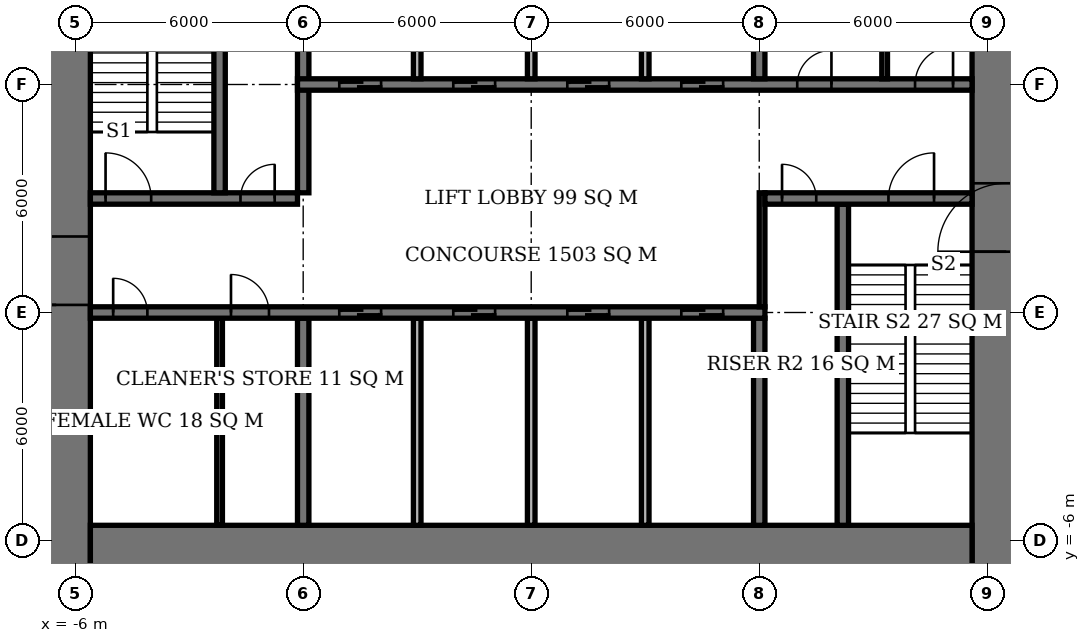
"""IFC4 building model, lengths in metres.
Left out: names, types, materials, properties, quantities, classifications, styles, units other than length and angle.
Written with IfcOpenShell. Run it as: python <this file> out.ifc"""

import sys

from ifc_helpers import new_model, si_unit, direction, frame, frame_2d, origin, place, context, subcontext, project, spatial, rectangle, extrude, element, fill, save


model = new_model("IFC4")
c1 = context("Model", 3, precision=1e-05, world=origin(), true_north=direction((0.0, 1.0)))
c2 = subcontext(c1, "Body", "Model", "MODEL_VIEW")
j1 = project(units=[si_unit("LENGTHUNIT", "METRE"), si_unit("PLANEANGLEUNIT", "RADIAN")], contexts=[c1])
p1 = place(None, origin())
s1 = spatial("IfcSite", under=j1, at=p1, CompositionType="ELEMENT")
p2 = place(p1, origin())
s2 = spatial("IfcBuilding", under=s1, at=p2, CompositionType="ELEMENT")
p3 = place(p2, origin())
s3 = spatial("IfcBuildingStorey", under=s2, at=p3, CompositionType="ELEMENT", Elevation=0.0)
p4 = place(p3, frame((-5.6, -6.6, 0.0), z_axis=(0.0, 0.0, 1.0), x_axis=(1.0, 0.0, 0.0)))
e1 = element("IfcWall", 1, at=p4, inside=s3, PredefinedType="SHEAR", context=c2, shape_type="SweptSolid", body=[
    extrude(rectangle(XDim=23.2, YDim=2.0, at=frame_2d((11.6, 0.0))), origin(), (0.0, 0.0, 1.0), 6.0),
])
p5 = place(p3, frame((-6.5, -7.6, 0.0), z_axis=(0.0, 0.0, 1.0), x_axis=(0.0, 1.0, 0.0)))
e2 = element("IfcWall", 2, at=p5, inside=s3, PredefinedType="SHEAR", context=c2, shape_type="SweptSolid", body=[
    extrude(rectangle(XDim=21.2, YDim=1.8, at=frame_2d((10.6, 0.0))), origin(), (0.0, 0.0, 1.0), 6.0),
])
p6 = place(p5, frame((7.8, 0.0, 0.0)))
e3 = element("IfcOpeningElement", 3, at=p6, cuts=e2, PredefinedType="OPENING", context=c2, shape_type="SweptSolid", body=[
    extrude(rectangle(XDim=1.8, YDim=2.4, at=frame_2d((0.9, 1.2))), frame((0.0, 0.91, 0.0), z_axis=(0.0, -1.0, 0.0), x_axis=(1.0, 0.0, 0.0)), (0.0, 0.0, 1.0), 1.82),
])
p7 = place(p3, frame((18.5, -7.6, 0.0), z_axis=(0.0, 0.0, 1.0), x_axis=(0.0, 1.0, 0.0)))
e4 = element("IfcWall", 4, at=p7, inside=s3, PredefinedType="SHEAR", context=c2, shape_type="SweptSolid", body=[
    extrude(rectangle(XDim=21.2, YDim=1.8, at=frame_2d((10.6, 0.0))), origin(), (0.0, 0.0, 1.0), 6.0),
])
p8 = place(p7, frame((9.2, 0.0, 0.0)))
e5 = element("IfcOpeningElement", 5, at=p8, cuts=e4, PredefinedType="OPENING", context=c2, shape_type="SweptSolid", body=[
    extrude(rectangle(XDim=1.8, YDim=2.4, at=frame_2d((0.9, 1.2))), frame((0.0, 0.91, 0.0), z_axis=(0.0, -1.0, 0.0), x_axis=(1.0, 0.0, 0.0)), (0.0, 0.0, 1.0), 1.82),
])
p9 = place(p3, frame((-5.6, 0.0, 0.0), z_axis=(0.0, 0.0, 1.0), x_axis=(1.0, 0.0, 0.0)))
e6 = element("IfcWall", 6, at=p9, inside=s3, PredefinedType="SHEAR", context=c2, shape_type="SweptSolid", body=[
    extrude(rectangle(XDim=17.75, YDim=0.3, at=frame_2d((8.875, 0.0))), origin(), (0.0, 0.0, 1.0), 6.0),
])
p10 = place(p9, frame((0.6, 0.0, 0.0)))
e7 = element("IfcOpeningElement", 7, at=p10, cuts=e6, PredefinedType="OPENING", context=c2, shape_type="SweptSolid", body=[
    extrude(rectangle(XDim=0.9, YDim=2.1, at=frame_2d((0.45, 1.05))), frame((0.0, 0.16, 0.0), z_axis=(0.0, -1.0, 0.0), x_axis=(1.0, 0.0, 0.0)), (0.0, 0.0, 1.0), 0.32),
])
p11 = place(p9, frame((3.7, 0.0, 0.0)))
e8 = element("IfcOpeningElement", 8, at=p11, cuts=e6, PredefinedType="OPENING", context=c2, shape_type="SweptSolid", body=[
    extrude(rectangle(XDim=1.0, YDim=2.1, at=frame_2d((0.5, 1.05))), frame((0.0, 0.16, 0.0), z_axis=(0.0, -1.0, 0.0), x_axis=(1.0, 0.0, 0.0)), (0.0, 0.0, 1.0), 0.32),
])
p12 = place(p9, frame((6.55, 0.0, 0.0)))
e9 = element("IfcOpeningElement", 9, at=p12, cuts=e6, PredefinedType="OPENING", context=c2, shape_type="SweptSolid", body=[
    extrude(rectangle(XDim=1.1, YDim=2.1, at=frame_2d((0.55, 1.05))), frame((0.0, 0.16, 0.0), z_axis=(0.0, -1.0, 0.0), x_axis=(1.0, 0.0, 0.0)), (0.0, 0.0, 1.0), 0.32),
])
p13 = place(p9, frame((9.55, 0.0, 0.0)))
e10 = element("IfcOpeningElement", 10, at=p13, cuts=e6, PredefinedType="OPENING", context=c2, shape_type="SweptSolid", body=[
    extrude(rectangle(XDim=1.1, YDim=2.1, at=frame_2d((0.55, 1.05))), frame((0.0, 0.16, 0.0), z_axis=(0.0, -1.0, 0.0), x_axis=(1.0, 0.0, 0.0)), (0.0, 0.0, 1.0), 0.32),
])
p14 = place(p9, frame((12.55, 0.0, 0.0)))
e11 = element("IfcOpeningElement", 11, at=p14, cuts=e6, PredefinedType="OPENING", context=c2, shape_type="SweptSolid", body=[
    extrude(rectangle(XDim=1.1, YDim=2.1, at=frame_2d((0.55, 1.05))), frame((0.0, 0.16, 0.0), z_axis=(0.0, -1.0, 0.0), x_axis=(1.0, 0.0, 0.0)), (0.0, 0.0, 1.0), 0.32),
])
p15 = place(p9, frame((15.55, 0.0, 0.0)))
e12 = element("IfcOpeningElement", 12, at=p15, cuts=e6, PredefinedType="OPENING", context=c2, shape_type="SweptSolid", body=[
    extrude(rectangle(XDim=1.1, YDim=2.1, at=frame_2d((0.55, 1.05))), frame((0.0, 0.16, 0.0), z_axis=(0.0, -1.0, 0.0), x_axis=(1.0, 0.0, 0.0)), (0.0, 0.0, 1.0), 0.32),
])
p16 = place(p3, frame((-5.6, 3.0, 0.0), z_axis=(0.0, 0.0, 1.0), x_axis=(1.0, 0.0, 0.0)))
e13 = element("IfcWall", 13, at=p16, inside=s3, PredefinedType="SHEAR", context=c2, shape_type="SweptSolid", body=[
    extrude(rectangle(XDim=5.45, YDim=0.3, at=frame_2d((2.725, 0.0))), origin(), (0.0, 0.0, 1.0), 6.0),
])
p17 = place(p16, frame((0.4, 0.0, 0.0)))
e14 = element("IfcOpeningElement", 14, at=p17, cuts=e13, PredefinedType="OPENING", context=c2, shape_type="SweptSolid", body=[
    extrude(rectangle(XDim=1.2, YDim=2.1, at=frame_2d((0.6, 1.05))), frame((0.0, 0.16, 0.0), z_axis=(0.0, -1.0, 0.0), x_axis=(1.0, 0.0, 0.0)), (0.0, 0.0, 1.0), 0.32),
])
p18 = place(p16, frame((3.95, 0.0, 0.0)))
e15 = element("IfcOpeningElement", 15, at=p18, cuts=e13, PredefinedType="OPENING", context=c2, shape_type="SweptSolid", body=[
    extrude(rectangle(XDim=0.9, YDim=2.1, at=frame_2d((0.45, 1.05))), frame((0.0, 0.16, 0.0), z_axis=(0.0, -1.0, 0.0), x_axis=(1.0, 0.0, 0.0)), (0.0, 0.0, 1.0), 0.32),
])
p19 = place(p3, frame((12.15, 3.0, 0.0), z_axis=(0.0, 0.0, 1.0), x_axis=(1.0, 0.0, 0.0)))
e16 = element("IfcWall", 16, at=p19, inside=s3, PredefinedType="SHEAR", context=c2, shape_type="SweptSolid", body=[
    extrude(rectangle(XDim=5.45, YDim=0.3, at=frame_2d((2.725, 0.0))), origin(), (0.0, 0.0, 1.0), 6.0),
])
p20 = place(p19, frame((3.25, 0.0, 0.0)))
e17 = element("IfcOpeningElement", 17, at=p20, cuts=e16, PredefinedType="OPENING", context=c2, shape_type="SweptSolid", body=[
    extrude(rectangle(XDim=1.2, YDim=2.1, at=frame_2d((0.6, 1.05))), frame((0.0, 0.16, 0.0), z_axis=(0.0, -1.0, 0.0), x_axis=(1.0, 0.0, 0.0)), (0.0, 0.0, 1.0), 0.32),
])
p21 = place(p19, frame((0.45, 0.0, 0.0)))
e18 = element("IfcOpeningElement", 18, at=p21, cuts=e16, PredefinedType="OPENING", context=c2, shape_type="SweptSolid", body=[
    extrude(rectangle(XDim=0.9, YDim=2.1, at=frame_2d((0.45, 1.05))), frame((0.0, 0.16, 0.0), z_axis=(0.0, -1.0, 0.0), x_axis=(1.0, 0.0, 0.0)), (0.0, 0.0, 1.0), 0.32),
])
p22 = place(p3, frame((-0.15, 6.0, 0.0), z_axis=(0.0, 0.0, 1.0), x_axis=(1.0, 0.0, 0.0)))
e19 = element("IfcWall", 19, at=p22, inside=s3, PredefinedType="SHEAR", context=c2, shape_type="SweptSolid", body=[
    extrude(rectangle(XDim=17.75, YDim=0.3, at=frame_2d((8.875, 0.0))), origin(), (0.0, 0.0, 1.0), 6.0),
])
p23 = place(p22, frame((13.15, 0.0, 0.0)))
e20 = element("IfcOpeningElement", 20, at=p23, cuts=e19, PredefinedType="OPENING", context=c2, shape_type="SweptSolid", body=[
    extrude(rectangle(XDim=0.9, YDim=2.1, at=frame_2d((0.45, 1.05))), frame((0.0, 0.16, 0.0), z_axis=(0.0, -1.0, 0.0), x_axis=(1.0, 0.0, 0.0)), (0.0, 0.0, 1.0), 0.32),
])
p24 = place(p22, frame((16.25, 0.0, 0.0)))
e21 = element("IfcOpeningElement", 21, at=p24, cuts=e19, PredefinedType="OPENING", context=c2, shape_type="SweptSolid", body=[
    extrude(rectangle(XDim=1.0, YDim=2.1, at=frame_2d((0.5, 1.05))), frame((0.0, 0.16, 0.0), z_axis=(0.0, -1.0, 0.0), x_axis=(1.0, 0.0, 0.0)), (0.0, 0.0, 1.0), 0.32),
])
p25 = place(p22, frame((1.1, 0.0, 0.0)))
e22 = element("IfcOpeningElement", 22, at=p25, cuts=e19, PredefinedType="OPENING", context=c2, shape_type="SweptSolid", body=[
    extrude(rectangle(XDim=1.1, YDim=2.1, at=frame_2d((0.55, 1.05))), frame((0.0, 0.16, 0.0), z_axis=(0.0, -1.0, 0.0), x_axis=(1.0, 0.0, 0.0)), (0.0, 0.0, 1.0), 0.32),
])
p26 = place(p22, frame((4.1, 0.0, 0.0)))
e23 = element("IfcOpeningElement", 23, at=p26, cuts=e19, PredefinedType="OPENING", context=c2, shape_type="SweptSolid", body=[
    extrude(rectangle(XDim=1.1, YDim=2.1, at=frame_2d((0.55, 1.05))), frame((0.0, 0.16, 0.0), z_axis=(0.0, -1.0, 0.0), x_axis=(1.0, 0.0, 0.0)), (0.0, 0.0, 1.0), 0.32),
])
p27 = place(p22, frame((7.1, 0.0, 0.0)))
e24 = element("IfcOpeningElement", 24, at=p27, cuts=e19, PredefinedType="OPENING", context=c2, shape_type="SweptSolid", body=[
    extrude(rectangle(XDim=1.1, YDim=2.1, at=frame_2d((0.55, 1.05))), frame((0.0, 0.16, 0.0), z_axis=(0.0, -1.0, 0.0), x_axis=(1.0, 0.0, 0.0)), (0.0, 0.0, 1.0), 0.32),
])
p28 = place(p22, frame((10.1, 0.0, 0.0)))
e25 = element("IfcOpeningElement", 25, at=p28, cuts=e19, PredefinedType="OPENING", context=c2, shape_type="SweptSolid", body=[
    extrude(rectangle(XDim=1.1, YDim=2.1, at=frame_2d((0.55, 1.05))), frame((0.0, 0.16, 0.0), z_axis=(0.0, -1.0, 0.0), x_axis=(1.0, 0.0, 0.0)), (0.0, 0.0, 1.0), 0.32),
])
p29 = place(p3, frame((0.0, -5.6, 0.0), z_axis=(0.0, 0.0, 1.0), x_axis=(0.0, 1.0, 0.0)))
e26 = element("IfcWall", 26, at=p29, inside=s3, PredefinedType="SHEAR", context=c2, shape_type="SweptSolid", body=[
    extrude(rectangle(XDim=5.45, YDim=0.3, at=frame_2d((2.725, 0.0))), origin(), (0.0, 0.0, 1.0), 6.0),
])
p30 = place(p3, frame((0.0, 3.15, 0.0), z_axis=(0.0, 0.0, 1.0), x_axis=(0.0, 1.0, 0.0)))
e27 = element("IfcWall", 27, at=p30, inside=s3, PredefinedType="SHEAR", context=c2, shape_type="SweptSolid", body=[
    extrude(rectangle(XDim=8.45, YDim=0.3, at=frame_2d((4.225, 0.0))), origin(), (0.0, 0.0, 1.0), 6.0),
])
for number, where, z_axis, x_axis in (
    (28, (12.0, -5.6, 0.0), (0.0, 0.0, 1.0), (0.0, 1.0, 0.0)),
    (29, (12.0, 6.15, 0.0), (0.0, 0.0, 1.0), (0.0, 1.0, 0.0)),
):
    element("IfcWall", number, at=place(p3, frame(where, z_axis=z_axis, x_axis=x_axis)), inside=s3, PredefinedType="SHEAR", context=c2, shape_type="SweptSolid", body=[
        extrude(rectangle(XDim=5.45, YDim=0.3, at=frame_2d((2.725, 0.0))), origin(), (0.0, 0.0, 1.0), 6.0),
    ])
for number, where, z_axis, x_axis in (
    (30, (-2.2, 3.15, 0.0), (0.0, 0.0, 1.0), (0.0, 1.0, 0.0)),
    (31, (14.2, -5.6, 0.0), (0.0, 0.0, 1.0), (0.0, 1.0, 0.0)),
):
    element("IfcWall", number, at=place(p3, frame(where, z_axis=z_axis, x_axis=x_axis)), inside=s3, PredefinedType="SHEAR", context=c2, shape_type="SweptSolid", body=[
        extrude(rectangle(XDim=8.45, YDim=0.3, at=frame_2d((4.225, 0.0))), origin(), (0.0, 0.0, 1.0), 6.0),
    ])
for number, where, z_axis, x_axis in (
    (32, (3.0, 6.15, 0.0), (0.0, 0.0, 1.0), (0.0, 1.0, 0.0)),
    (33, (6.0, 6.15, 0.0), (0.0, 0.0, 1.0), (0.0, 1.0, 0.0)),
    (34, (9.0, 6.15, 0.0), (0.0, 0.0, 1.0), (0.0, 1.0, 0.0)),
    (35, (3.0, -5.6, 0.0), (0.0, 0.0, 1.0), (0.0, 1.0, 0.0)),
    (36, (6.0, -5.6, 0.0), (0.0, 0.0, 1.0), (0.0, 1.0, 0.0)),
    (37, (9.0, -5.6, 0.0), (0.0, 0.0, 1.0), (0.0, 1.0, 0.0)),
):
    element("IfcWall", number, at=place(p3, frame(where, z_axis=z_axis, x_axis=x_axis)), inside=s3, PredefinedType="SOLIDWALL", context=c2, shape_type="SweptSolid", body=[
        extrude(rectangle(XDim=5.45, YDim=0.2, at=frame_2d((2.725, 0.0))), origin(), (0.0, 0.0, 1.0), 6.0),
    ])
for number, where, z_axis, x_axis in (
    (38, (-2.2, -5.6, 0.0), (0.0, 0.0, 1.0), (0.0, 1.0, 0.0)),
    (39, (15.3, 6.15, 0.0), (0.0, 0.0, 1.0), (0.0, 1.0, 0.0)),
):
    element("IfcWall", number, at=place(p3, frame(where, z_axis=z_axis, x_axis=x_axis)), inside=s3, PredefinedType="PLUMBINGWALL", context=c2, shape_type="SweptSolid", body=[
        extrude(rectangle(XDim=5.45, YDim=0.15, at=frame_2d((2.725, 0.0))), origin(), (0.0, 0.0, 1.0), 5.75),
    ])
p31 = place(p3, frame((12.075, 0.15, 0.0), z_axis=(0.0, 0.0, 1.0), x_axis=(0.0, 1.0, 0.0)))
e40 = element("IfcWall", 40, at=p31, inside=s3, PredefinedType="PARTITIONING", context=c2, shape_type="SweptSolid", body=[
    extrude(rectangle(XDim=3.0, YDim=0.15, at=frame_2d((1.5, 0.0))), origin(), (0.0, 0.0, 1.0), 5.75),
])
p32 = place(p6, origin())
e41 = element("IfcDoor", 41, at=p32, inside=s3, OperationType="DOUBLE_DOOR_SINGLE_SWING", PredefinedType="DOOR", context=c2, shape_type="SweptSolid", body=[
    extrude(rectangle(XDim=1.8, YDim=2.4, at=frame_2d((0.9, 1.2))), frame((0.0, 0.025, 0.0), z_axis=(0.0, -1.0, 0.0), x_axis=(1.0, 0.0, 0.0)), (0.0, 0.0, 1.0), 0.05),
])
fill(e3, e41)
p33 = place(p8, origin())
e42 = element("IfcDoor", 42, at=p33, inside=s3, OperationType="DOUBLE_DOOR_SINGLE_SWING", PredefinedType="DOOR", context=c2, shape_type="SweptSolid", body=[
    extrude(rectangle(XDim=1.8, YDim=2.4, at=frame_2d((0.9, 1.2))), frame((0.0, 0.025, 0.0), z_axis=(0.0, -1.0, 0.0), x_axis=(1.0, 0.0, 0.0)), (0.0, 0.0, 1.0), 0.05),
])
fill(e5, e42)
p34 = place(p17, origin())
e43 = element("IfcDoor", 43, at=p34, inside=s3, OperationType="SINGLE_SWING_LEFT", PredefinedType="DOOR", context=c2, shape_type="SweptSolid", body=[
    extrude(rectangle(XDim=1.2, YDim=2.1, at=frame_2d((0.6, 1.05))), frame((0.0, 0.025, 0.0), z_axis=(0.0, -1.0, 0.0), x_axis=(1.0, 0.0, 0.0)), (0.0, 0.0, 1.0), 0.05),
])
fill(e14, e43)
p35 = place(p18, origin())
e44 = element("IfcDoor", 44, at=p35, inside=s3, OperationType="SINGLE_SWING_RIGHT", PredefinedType="DOOR", context=c2, shape_type="SweptSolid", body=[
    extrude(rectangle(XDim=0.9, YDim=2.1, at=frame_2d((0.45, 1.05))), frame((0.0, 0.025, 0.0), z_axis=(0.0, -1.0, 0.0), x_axis=(1.0, 0.0, 0.0)), (0.0, 0.0, 1.0), 0.05),
])
fill(e15, e44)
p36 = place(p20, origin())
e45 = element("IfcDoor", 45, at=p36, inside=s3, OperationType="SINGLE_SWING_RIGHT", PredefinedType="DOOR", context=c2, shape_type="SweptSolid", body=[
    extrude(rectangle(XDim=1.2, YDim=2.1, at=frame_2d((0.6, 1.05))), frame((0.0, 0.025, 0.0), z_axis=(0.0, -1.0, 0.0), x_axis=(1.0, 0.0, 0.0)), (0.0, 0.0, 1.0), 0.05),
])
fill(e17, e45)
p37 = place(p21, origin())
e46 = element("IfcDoor", 46, at=p37, inside=s3, OperationType="SINGLE_SWING_LEFT", PredefinedType="DOOR", context=c2, shape_type="SweptSolid", body=[
    extrude(rectangle(XDim=0.9, YDim=2.1, at=frame_2d((0.45, 1.05))), frame((0.0, 0.025, 0.0), z_axis=(0.0, -1.0, 0.0), x_axis=(1.0, 0.0, 0.0)), (0.0, 0.0, 1.0), 0.05),
])
fill(e18, e46)
p38 = place(p10, origin())
e47 = element("IfcDoor", 47, at=p38, inside=s3, OperationType="SINGLE_SWING_LEFT", PredefinedType="DOOR", context=c2, shape_type="SweptSolid", body=[
    extrude(rectangle(XDim=0.9, YDim=2.1, at=frame_2d((0.45, 1.05))), frame((0.0, 0.025, 0.0), z_axis=(0.0, -1.0, 0.0), x_axis=(1.0, 0.0, 0.0)), (0.0, 0.0, 1.0), 0.05),
])
fill(e7, e47)
p39 = place(p11, origin())
e48 = element("IfcDoor", 48, at=p39, inside=s3, OperationType="SINGLE_SWING_LEFT", PredefinedType="DOOR", context=c2, shape_type="SweptSolid", body=[
    extrude(rectangle(XDim=1.0, YDim=2.1, at=frame_2d((0.5, 1.05))), frame((0.0, 0.025, 0.0), z_axis=(0.0, -1.0, 0.0), x_axis=(1.0, 0.0, 0.0)), (0.0, 0.0, 1.0), 0.05),
])
fill(e8, e48)
p40 = place(p23, origin())
e49 = element("IfcDoor", 49, at=p40, inside=s3, OperationType="SINGLE_SWING_RIGHT", PredefinedType="DOOR", context=c2, shape_type="SweptSolid", body=[
    extrude(rectangle(XDim=0.9, YDim=2.1, at=frame_2d((0.45, 1.05))), frame((0.0, 0.025, 0.0), z_axis=(0.0, -1.0, 0.0), x_axis=(1.0, 0.0, 0.0)), (0.0, 0.0, 1.0), 0.05),
])
fill(e20, e49)
p41 = place(p24, origin())
e50 = element("IfcDoor", 50, at=p41, inside=s3, OperationType="SINGLE_SWING_RIGHT", PredefinedType="DOOR", context=c2, shape_type="SweptSolid", body=[
    extrude(rectangle(XDim=1.0, YDim=2.1, at=frame_2d((0.5, 1.05))), frame((0.0, 0.025, 0.0), z_axis=(0.0, -1.0, 0.0), x_axis=(1.0, 0.0, 0.0)), (0.0, 0.0, 1.0), 0.05),
])
fill(e21, e50)
p42 = place(p25, origin())
e51 = element("IfcDoor", 51, at=p42, inside=s3, OperationType="DOUBLE_DOOR_SLIDING", PredefinedType="USERDEFINED", context=c2, shape_type="SweptSolid", body=[
    extrude(rectangle(XDim=1.1, YDim=2.1, at=frame_2d((0.55, 1.05))), frame((0.0, 0.025, 0.0), z_axis=(0.0, -1.0, 0.0), x_axis=(1.0, 0.0, 0.0)), (0.0, 0.0, 1.0), 0.05),
])
fill(e22, e51)
p43 = place(p26, origin())
e52 = element("IfcDoor", 52, at=p43, inside=s3, OperationType="DOUBLE_DOOR_SLIDING", PredefinedType="USERDEFINED", context=c2, shape_type="SweptSolid", body=[
    extrude(rectangle(XDim=1.1, YDim=2.1, at=frame_2d((0.55, 1.05))), frame((0.0, 0.025, 0.0), z_axis=(0.0, -1.0, 0.0), x_axis=(1.0, 0.0, 0.0)), (0.0, 0.0, 1.0), 0.05),
])
fill(e23, e52)
p44 = place(p27, origin())
e53 = element("IfcDoor", 53, at=p44, inside=s3, OperationType="DOUBLE_DOOR_SLIDING", PredefinedType="USERDEFINED", context=c2, shape_type="SweptSolid", body=[
    extrude(rectangle(XDim=1.1, YDim=2.1, at=frame_2d((0.55, 1.05))), frame((0.0, 0.025, 0.0), z_axis=(0.0, -1.0, 0.0), x_axis=(1.0, 0.0, 0.0)), (0.0, 0.0, 1.0), 0.05),
])
fill(e24, e53)
p45 = place(p28, origin())
e54 = element("IfcDoor", 54, at=p45, inside=s3, OperationType="DOUBLE_DOOR_SLIDING", PredefinedType="USERDEFINED", context=c2, shape_type="SweptSolid", body=[
    extrude(rectangle(XDim=1.1, YDim=2.1, at=frame_2d((0.55, 1.05))), frame((0.0, 0.025, 0.0), z_axis=(0.0, -1.0, 0.0), x_axis=(1.0, 0.0, 0.0)), (0.0, 0.0, 1.0), 0.05),
])
fill(e25, e54)
p46 = place(p12, origin())
e55 = element("IfcDoor", 55, at=p46, inside=s3, OperationType="DOUBLE_DOOR_SLIDING", PredefinedType="USERDEFINED", context=c2, shape_type="SweptSolid", body=[
    extrude(rectangle(XDim=1.1, YDim=2.1, at=frame_2d((0.55, 1.05))), frame((0.0, 0.025, 0.0), z_axis=(0.0, -1.0, 0.0), x_axis=(1.0, 0.0, 0.0)), (0.0, 0.0, 1.0), 0.05),
])
fill(e9, e55)
p47 = place(p13, origin())
e56 = element("IfcDoor", 56, at=p47, inside=s3, OperationType="DOUBLE_DOOR_SLIDING", PredefinedType="USERDEFINED", context=c2, shape_type="SweptSolid", body=[
    extrude(rectangle(XDim=1.1, YDim=2.1, at=frame_2d((0.55, 1.05))), frame((0.0, 0.025, 0.0), z_axis=(0.0, -1.0, 0.0), x_axis=(1.0, 0.0, 0.0)), (0.0, 0.0, 1.0), 0.05),
])
fill(e10, e56)
p48 = place(p14, origin())
e57 = element("IfcDoor", 57, at=p48, inside=s3, OperationType="DOUBLE_DOOR_SLIDING", PredefinedType="USERDEFINED", context=c2, shape_type="SweptSolid", body=[
    extrude(rectangle(XDim=1.1, YDim=2.1, at=frame_2d((0.55, 1.05))), frame((0.0, 0.025, 0.0), z_axis=(0.0, -1.0, 0.0), x_axis=(1.0, 0.0, 0.0)), (0.0, 0.0, 1.0), 0.05),
])
fill(e11, e57)
p49 = place(p15, origin())
e58 = element("IfcDoor", 58, at=p49, inside=s3, OperationType="DOUBLE_DOOR_SLIDING", PredefinedType="USERDEFINED", context=c2, shape_type="SweptSolid", body=[
    extrude(rectangle(XDim=1.1, YDim=2.1, at=frame_2d((0.55, 1.05))), frame((0.0, 0.025, 0.0), z_axis=(0.0, -1.0, 0.0), x_axis=(1.0, 0.0, 0.0)), (0.0, 0.0, 1.0), 0.05),
])
fill(e12, e58)
save(model, sys.argv[1])
